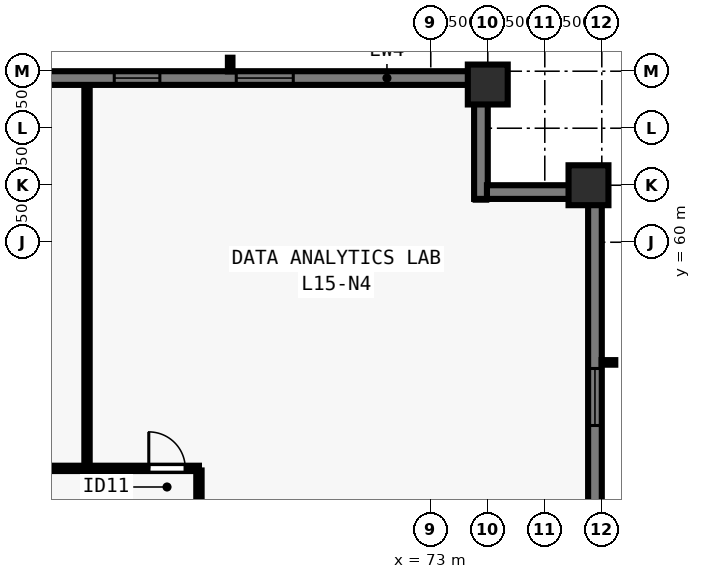
"""IFC4 building model, lengths in metres.
Left out: names, types, materials, properties, quantities, classifications, styles, units other than length and angle.
Written with IfcOpenShell. Run it as: python <this file> out.ifc"""

import sys

from ifc_helpers import new_model, si_unit, direction, frame, frame_2d, origin, origin_2d, place, context, subcontext, project, spatial, rectangle, extrude, element, fill, save


model = new_model("IFC4")
c1 = context("Model", 3, precision=1e-05, world=origin(), true_north=direction((0.0, 1.0)))
c2 = subcontext(c1, "Body", "Model", "MODEL_VIEW")
j1 = project(units=[si_unit("LENGTHUNIT", "METRE"), si_unit("PLANEANGLEUNIT", "RADIAN")], contexts=[c1])
p1 = place(None, origin())
s1 = spatial("IfcSite", under=j1, at=p1, CompositionType="ELEMENT")
p2 = place(p1, origin())
s2 = spatial("IfcBuilding", under=s1, at=p2, CompositionType="ELEMENT")
p3 = place(p2, frame((0.0, 0.0, 58.5)))
s3 = spatial("IfcBuildingStorey", under=s2, at=p3, CompositionType="ELEMENT", Elevation=58.5)
for number, where, z_axis, x_axis in (
    (1, (77.15, 61.5, 0.0), (0.0, 0.0, 1.0), (0.0, 1.0, 0.0)),
    (2, (74.5, 64.15, 0.0), (0.0, 0.0, 1.0), (1.0, 0.0, 0.0)),
):
    element("IfcColumn", number, at=place(p3, frame(where, z_axis=z_axis, x_axis=x_axis)), inside=s3, PredefinedType="COLUMN", context=c2, shape_type="SweptSolid", body=[
        extrude(rectangle(XDim=1.05, YDim=1.05, at=origin_2d()), origin(), (0.0, 0.0, 1.0), 3.5),
    ])
p4 = place(p3, frame((29.5, 64.32, 0.0), z_axis=(0.0, 0.0, 1.0), x_axis=(1.0, 0.0, 0.0)))
e3 = element("IfcWall", 3, at=p4, inside=s3, PredefinedType="SOLIDWALL", context=c2, shape_type="SweptSolid", body=[
    extrude(rectangle(XDim=44.662, YDim=0.36, at=frame_2d((22.331, 0.0))), origin(), (0.0, 0.0, 1.0), 3.28),
])
p5 = place(p4, frame((4.78, 0.0, 0.8)))
e4 = element("IfcOpeningElement", 4, at=p5, cuts=e3, PredefinedType="OPENING", context=c2, shape_type="SweptSolid", body=[
    extrude(rectangle(XDim=1.5, YDim=1.544, at=frame_2d((0.75, 0.772))), frame((0.0, 0.19, 0.0), z_axis=(0.0, -1.0, 0.0), x_axis=(1.0, 0.0, 0.0)), (0.0, 0.0, 1.0), 0.38),
])
p6 = place(p4, frame((7.84, 0.0, 0.8)))
e5 = element("IfcOpeningElement", 5, at=p6, cuts=e3, PredefinedType="OPENING", context=c2, shape_type="SweptSolid", body=[
    extrude(rectangle(XDim=1.2, YDim=1.544, at=frame_2d((0.6, 0.772))), frame((0.0, 0.19, 0.0), z_axis=(0.0, -1.0, 0.0), x_axis=(1.0, 0.0, 0.0)), (0.0, 0.0, 1.0), 0.38),
])
p7 = place(p4, frame((11.5, 0.0, 0.8)))
e6 = element("IfcOpeningElement", 6, at=p7, cuts=e3, PredefinedType="OPENING", context=c2, shape_type="SweptSolid", body=[
    extrude(rectangle(XDim=1.5, YDim=1.544, at=frame_2d((0.75, 0.772))), frame((0.0, 0.19, 0.0), z_axis=(0.0, -1.0, 0.0), x_axis=(1.0, 0.0, 0.0)), (0.0, 0.0, 1.0), 0.38),
])
p8 = place(p4, frame((15.01, 0.0, 0.8)))
e7 = element("IfcOpeningElement", 7, at=p8, cuts=e3, PredefinedType="OPENING", context=c2, shape_type="SweptSolid", body=[
    extrude(rectangle(XDim=1.2, YDim=1.544, at=frame_2d((0.6, 0.772))), frame((0.0, 0.19, 0.0), z_axis=(0.0, -1.0, 0.0), x_axis=(1.0, 0.0, 0.0)), (0.0, 0.0, 1.0), 0.38),
])
p9 = place(p4, frame((18.671, 0.0, 0.8)))
e8 = element("IfcOpeningElement", 8, at=p9, cuts=e3, PredefinedType="OPENING", context=c2, shape_type="SweptSolid", body=[
    extrude(rectangle(XDim=1.5, YDim=1.544, at=frame_2d((0.75, 0.772))), frame((0.0, 0.19, 0.0), z_axis=(0.0, -1.0, 0.0), x_axis=(1.0, 0.0, 0.0)), (0.0, 0.0, 1.0), 0.38),
])
p10 = place(p4, frame((21.281, 0.0, 0.8)))
e9 = element("IfcOpeningElement", 9, at=p10, cuts=e3, PredefinedType="OPENING", context=c2, shape_type="SweptSolid", body=[
    extrude(rectangle(XDim=1.2, YDim=1.544, at=frame_2d((0.6, 0.772))), frame((0.0, 0.19, 0.0), z_axis=(0.0, -1.0, 0.0), x_axis=(1.0, 0.0, 0.0)), (0.0, 0.0, 1.0), 0.38),
])
p11 = place(p4, frame((24.941, 0.0, 0.8)))
e10 = element("IfcOpeningElement", 10, at=p11, cuts=e3, PredefinedType="OPENING", context=c2, shape_type="SweptSolid", body=[
    extrude(rectangle(XDim=1.5, YDim=1.544, at=frame_2d((0.75, 0.772))), frame((0.0, 0.19, 0.0), z_axis=(0.0, -1.0, 0.0), x_axis=(1.0, 0.0, 0.0)), (0.0, 0.0, 1.0), 0.38),
])
p12 = place(p4, frame((28.451, 0.0, 0.8)))
e11 = element("IfcOpeningElement", 11, at=p12, cuts=e3, PredefinedType="OPENING", context=c2, shape_type="SweptSolid", body=[
    extrude(rectangle(XDim=1.2, YDim=1.544, at=frame_2d((0.6, 0.772))), frame((0.0, 0.19, 0.0), z_axis=(0.0, -1.0, 0.0), x_axis=(1.0, 0.0, 0.0)), (0.0, 0.0, 1.0), 0.38),
])
p13 = place(p4, frame((31.662, 0.0, 0.8)))
e12 = element("IfcOpeningElement", 12, at=p13, cuts=e3, PredefinedType="OPENING", context=c2, shape_type="SweptSolid", body=[
    extrude(rectangle(XDim=1.5, YDim=1.544, at=frame_2d((0.75, 0.772))), frame((0.0, 0.19, 0.0), z_axis=(0.0, -1.0, 0.0), x_axis=(1.0, 0.0, 0.0)), (0.0, 0.0, 1.0), 0.38),
])
p14 = place(p4, frame((35.172, 0.0, 0.8)))
e13 = element("IfcOpeningElement", 13, at=p14, cuts=e3, PredefinedType="OPENING", context=c2, shape_type="SweptSolid", body=[
    extrude(rectangle(XDim=1.2, YDim=1.544, at=frame_2d((0.6, 0.772))), frame((0.0, 0.19, 0.0), z_axis=(0.0, -1.0, 0.0), x_axis=(1.0, 0.0, 0.0)), (0.0, 0.0, 1.0), 0.38),
])
p15 = place(p4, frame((38.382, 0.0, 0.8)))
e14 = element("IfcOpeningElement", 14, at=p15, cuts=e3, PredefinedType="OPENING", context=c2, shape_type="SweptSolid", body=[
    extrude(rectangle(XDim=1.5, YDim=1.544, at=frame_2d((0.75, 0.772))), frame((0.0, 0.19, 0.0), z_axis=(0.0, -1.0, 0.0), x_axis=(1.0, 0.0, 0.0)), (0.0, 0.0, 1.0), 0.38),
])
p16 = place(p3, frame((74.32, 64.5, 0.0), z_axis=(0.0, 0.0, 1.0), x_axis=(0.0, -1.0, 0.0)))
e15 = element("IfcWall", 15, at=p16, inside=s3, PredefinedType="SOLIDWALL", context=c2, shape_type="SweptSolid", body=[
    extrude(rectangle(XDim=3.36, YDim=0.36, at=frame_2d((1.68, 0.0))), origin(), (0.0, 0.0, 1.0), 3.28),
])
p17 = place(p3, frame((74.478, 61.32, 0.0), z_axis=(0.0, 0.0, 1.0), x_axis=(1.0, 0.0, 0.0)))
e16 = element("IfcWall", 16, at=p17, inside=s3, PredefinedType="SOLIDWALL", context=c2, shape_type="SweptSolid", body=[
    extrude(rectangle(XDim=2.684, YDim=0.36, at=frame_2d((1.342, 0.0))), origin(), (0.0, 0.0, 1.0), 3.28),
])
p18 = place(p3, frame((77.32, 61.5, 0.0), z_axis=(0.0, 0.0, 1.0), x_axis=(0.0, -1.0, 0.0)))
e17 = element("IfcWall", 17, at=p18, inside=s3, PredefinedType="SOLIDWALL", context=c2, shape_type="SweptSolid", body=[
    extrude(rectangle(XDim=28.362, YDim=0.36, at=frame_2d((14.181, 0.0))), origin(), (0.0, 0.0, 1.0), 3.28),
])
p19 = place(p18, frame((4.822, 0.0, 0.8)))
e18 = element("IfcOpeningElement", 18, at=p19, cuts=e17, PredefinedType="OPENING", context=c2, shape_type="SweptSolid", body=[
    extrude(rectangle(XDim=1.5, YDim=1.544, at=frame_2d((0.75, 0.772))), frame((0.0, 0.19, 0.0), z_axis=(0.0, -1.0, 0.0), x_axis=(1.0, 0.0, 0.0)), (0.0, 0.0, 1.0), 0.38),
])
p20 = place(p18, frame((8.416, 0.0, 0.8)))
e19 = element("IfcOpeningElement", 19, at=p20, cuts=e17, PredefinedType="OPENING", context=c2, shape_type="SweptSolid", body=[
    extrude(rectangle(XDim=1.2, YDim=1.544, at=frame_2d((0.6, 0.772))), frame((0.0, 0.19, 0.0), z_axis=(0.0, -1.0, 0.0), x_axis=(1.0, 0.0, 0.0)), (0.0, 0.0, 1.0), 0.38),
])
p21 = place(p18, frame((11.709, 0.0, 0.8)))
e20 = element("IfcOpeningElement", 20, at=p21, cuts=e17, PredefinedType="OPENING", context=c2, shape_type="SweptSolid", body=[
    extrude(rectangle(XDim=1.5, YDim=1.544, at=frame_2d((0.75, 0.772))), frame((0.0, 0.19, 0.0), z_axis=(0.0, -1.0, 0.0), x_axis=(1.0, 0.0, 0.0)), (0.0, 0.0, 1.0), 0.38),
])
p22 = place(p18, frame((15.303, 0.0, 0.8)))
e21 = element("IfcOpeningElement", 21, at=p22, cuts=e17, PredefinedType="OPENING", context=c2, shape_type="SweptSolid", body=[
    extrude(rectangle(XDim=1.2, YDim=1.544, at=frame_2d((0.6, 0.772))), frame((0.0, 0.19, 0.0), z_axis=(0.0, -1.0, 0.0), x_axis=(1.0, 0.0, 0.0)), (0.0, 0.0, 1.0), 0.38),
])
p23 = place(p18, frame((18.596, 0.0, 0.8)))
e22 = element("IfcOpeningElement", 22, at=p23, cuts=e17, PredefinedType="OPENING", context=c2, shape_type="SweptSolid", body=[
    extrude(rectangle(XDim=1.5, YDim=1.544, at=frame_2d((0.75, 0.772))), frame((0.0, 0.19, 0.0), z_axis=(0.0, -1.0, 0.0), x_axis=(1.0, 0.0, 0.0)), (0.0, 0.0, 1.0), 0.38),
])
p24 = place(p18, frame((22.19, 0.0, 0.8)))
e23 = element("IfcOpeningElement", 23, at=p24, cuts=e17, PredefinedType="OPENING", context=c2, shape_type="SweptSolid", body=[
    extrude(rectangle(XDim=1.2, YDim=1.544, at=frame_2d((0.6, 0.772))), frame((0.0, 0.19, 0.0), z_axis=(0.0, -1.0, 0.0), x_axis=(1.0, 0.0, 0.0)), (0.0, 0.0, 1.0), 0.38),
])
p25 = place(p3, frame((37.1, 54.05, 0.0), z_axis=(0.0, 0.0, 1.0), x_axis=(1.0, 0.0, 0.0)))
e24 = element("IfcWall", 24, at=p25, inside=s3, PredefinedType="PARTITIONING", context=c2, shape_type="SweptSolid", body=[
    extrude(rectangle(XDim=29.8, YDim=0.14, at=frame_2d((14.9, 0.0))), origin(), (0.0, 0.0, 1.0), 3.28),
])
p26 = place(p25, frame((3.522, 0.0, 0.0)))
e25 = element("IfcOpeningElement", 25, at=p26, cuts=e24, PredefinedType="OPENING", context=c2, shape_type="SweptSolid", body=[
    extrude(rectangle(XDim=0.96, YDim=2.12, at=frame_2d((0.48, 1.06))), frame((0.0, 0.08, 0.0), z_axis=(0.0, -1.0, 0.0), x_axis=(1.0, 0.0, 0.0)), (0.0, 0.0, 1.0), 0.16),
])
p27 = place(p25, frame((8.06, 0.0, 0.0)))
e26 = element("IfcOpeningElement", 26, at=p27, cuts=e24, PredefinedType="OPENING", context=c2, shape_type="SweptSolid", body=[
    extrude(rectangle(XDim=0.96, YDim=2.12, at=frame_2d((0.48, 1.06))), frame((0.0, 0.08, 0.0), z_axis=(0.0, -1.0, 0.0), x_axis=(1.0, 0.0, 0.0)), (0.0, 0.0, 1.0), 0.16),
])
p28 = place(p25, frame((20.6, 0.0, 0.0)))
e27 = element("IfcOpeningElement", 27, at=p28, cuts=e24, PredefinedType="OPENING", context=c2, shape_type="SweptSolid", body=[
    extrude(rectangle(XDim=0.96, YDim=2.12, at=frame_2d((0.48, 1.06))), frame((0.0, 0.08, 0.0), z_axis=(0.0, -1.0, 0.0), x_axis=(1.0, 0.0, 0.0)), (0.0, 0.0, 1.0), 0.16),
])
p29 = place(p25, frame((28.48, 0.0, 0.0)))
e28 = element("IfcOpeningElement", 28, at=p29, cuts=e24, PredefinedType="OPENING", context=c2, shape_type="SweptSolid", body=[
    extrude(rectangle(XDim=0.96, YDim=2.12, at=frame_2d((0.48, 1.06))), frame((0.0, 0.08, 0.0), z_axis=(0.0, -1.0, 0.0), x_axis=(1.0, 0.0, 0.0)), (0.0, 0.0, 1.0), 0.16),
])
p30 = place(p3, frame((66.9, 24.005, 0.0), z_axis=(0.0, 0.0, 1.0), x_axis=(0.0, 1.0, 0.0)))
e29 = element("IfcWall", 29, at=p30, inside=s3, PredefinedType="PARTITIONING", context=c2, shape_type="SweptSolid", body=[
    extrude(rectangle(XDim=29.99, YDim=0.14, at=frame_2d((14.995, 0.0))), origin(), (0.0, 0.0, 1.0), 3.28),
])
p31 = place(p30, frame((4.344, 0.0, 0.0)))
e30 = element("IfcOpeningElement", 30, at=p31, cuts=e29, PredefinedType="OPENING", context=c2, shape_type="SweptSolid", body=[
    extrude(rectangle(XDim=0.96, YDim=2.12, at=frame_2d((0.48, 1.06))), frame((0.0, 0.08, 0.0), z_axis=(0.0, -1.0, 0.0), x_axis=(1.0, 0.0, 0.0)), (0.0, 0.0, 1.0), 0.16),
])
p32 = place(p30, frame((14.452, 0.0, 0.0)))
e31 = element("IfcOpeningElement", 31, at=p32, cuts=e29, PredefinedType="OPENING", context=c2, shape_type="SweptSolid", body=[
    extrude(rectangle(XDim=0.96, YDim=2.12, at=frame_2d((0.48, 1.06))), frame((0.0, 0.08, 0.0), z_axis=(0.0, -1.0, 0.0), x_axis=(1.0, 0.0, 0.0)), (0.0, 0.0, 1.0), 0.16),
])
p33 = place(p30, frame((24.623, 0.0, 0.0)))
e32 = element("IfcOpeningElement", 32, at=p33, cuts=e29, PredefinedType="OPENING", context=c2, shape_type="SweptSolid", body=[
    extrude(rectangle(XDim=0.96, YDim=2.12, at=frame_2d((0.48, 1.06))), frame((0.0, 0.08, 0.0), z_axis=(0.0, -1.0, 0.0), x_axis=(1.0, 0.0, 0.0)), (0.0, 0.0, 1.0), 0.16),
])
p34 = place(p3, frame((63.955, 54.15, 0.0), z_axis=(0.0, 0.0, 1.0), x_axis=(0.0, 1.0, 0.0)))
e33 = element("IfcWall", 33, at=p34, inside=s3, PredefinedType="PARTITIONING", context=c2, shape_type="SweptSolid", body=[
    extrude(rectangle(XDim=9.93, YDim=0.14, at=frame_2d((4.965, 0.0))), origin(), (0.0, 0.0, 1.0), 3.28),
])
p35 = place(p14, origin())
e34 = element("IfcWindow", 34, at=p35, inside=s3, PartitioningType="SINGLE_PANEL", PredefinedType="WINDOW", context=c2, shape_type="SweptSolid", body=[
    extrude(rectangle(XDim=1.2, YDim=1.544, at=frame_2d((0.6, 0.772))), frame((0.0, -0.05, 0.0), z_axis=(0.0, -1.0, 0.0), x_axis=(1.0, 0.0, 0.0)), (0.0, 0.0, 1.0), 0.06),
])
fill(e13, e34)
p36 = place(p15, origin())
e35 = element("IfcWindow", 35, at=p36, inside=s3, PartitioningType="SINGLE_PANEL", PredefinedType="WINDOW", context=c2, shape_type="SweptSolid", body=[
    extrude(rectangle(XDim=1.5, YDim=1.544, at=frame_2d((0.75, 0.772))), frame((0.0, -0.05, 0.0), z_axis=(0.0, -1.0, 0.0), x_axis=(1.0, 0.0, 0.0)), (0.0, 0.0, 1.0), 0.06),
])
fill(e14, e35)
p37 = place(p19, origin())
e36 = element("IfcWindow", 36, at=p37, inside=s3, PartitioningType="SINGLE_PANEL", PredefinedType="WINDOW", context=c2, shape_type="SweptSolid", body=[
    extrude(rectangle(XDim=1.5, YDim=1.544, at=frame_2d((0.75, 0.772))), frame((0.0, -0.05, 0.0), z_axis=(0.0, -1.0, 0.0), x_axis=(1.0, 0.0, 0.0)), (0.0, 0.0, 1.0), 0.06),
])
fill(e18, e36)
p38 = place(p29, origin())
e37 = element("IfcDoor", 37, at=p38, inside=s3, OperationType="SINGLE_SWING_LEFT", PredefinedType="DOOR", context=c2, shape_type="SweptSolid", body=[
    extrude(rectangle(XDim=0.96, YDim=2.12, at=frame_2d((0.48, 1.06))), frame((0.0, 0.025, 0.0), z_axis=(0.0, -1.0, 0.0), x_axis=(1.0, 0.0, 0.0)), (0.0, 0.0, 1.0), 0.05),
])
fill(e28, e37)
save(model, sys.argv[1])
